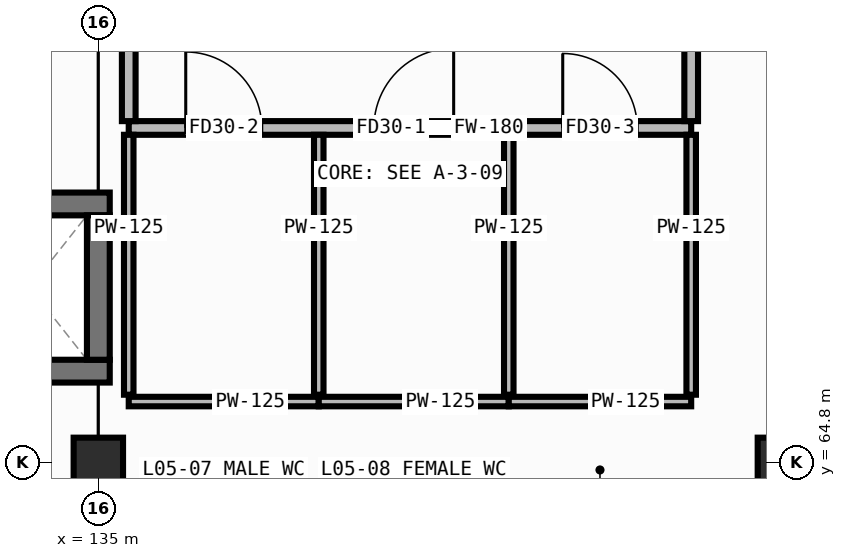
"""IFC4 building model, lengths in metres.
Left out: names, types, materials, properties, quantities, classifications, styles, units other than length and angle.
Written with IfcOpenShell. Run it as: python <this file> out.ifc"""

import sys

from ifc_helpers import new_model, si_unit, direction, frame, frame_2d, origin, origin_2d, place, context, subcontext, project, spatial, rectangle, hollow_rectangle, extrude, element, fill, save


model = new_model("IFC4")
c1 = context("Model", 3, precision=1e-05, world=origin(), true_north=direction((0.0, 1.0)))
c2 = subcontext(c1, "Body", "Model", "MODEL_VIEW")
j1 = project(units=[si_unit("LENGTHUNIT", "METRE"), si_unit("PLANEANGLEUNIT", "RADIAN")], contexts=[c1])
p1 = place(None, origin())
s1 = spatial("IfcSite", under=j1, at=p1, CompositionType="ELEMENT")
p2 = place(p1, origin())
s2 = spatial("IfcBuilding", under=s1, at=p2, CompositionType="ELEMENT")
p3 = place(p2, frame((0.0, 0.0, 17.0)))
s3 = spatial("IfcBuildingStorey", under=s2, at=p3, CompositionType="ELEMENT", Elevation=17.0)
for number, where, z_axis, x_axis in (
    (1, (135.0, 64.8, 0.0), (0.0, 0.0, 1.0), (1.0, 0.0, 0.0)),
    (2, (144.0, 64.8, 0.0), (0.0, 0.0, 1.0), (1.0, 0.0, 0.0)),
):
    element("IfcColumn", number, at=place(p3, frame(where, z_axis=z_axis, x_axis=x_axis)), inside=s3, PredefinedType="COLUMN", context=c2, shape_type="SweptSolid", body=[
        extrude(hollow_rectangle(XDim=0.65, YDim=0.65, WallThickness=0.025, at=origin_2d()), origin(), (0.0, 0.0, 1.0), 3.6),
    ])
for number, where, z_axis, x_axis in (
    (3, (133.05, 66.0, 0.0), (0.0, 0.0, 1.0), (1.0, 0.0, 0.0)),
    (4, (133.05, 68.2, 0.0), (0.0, 0.0, 1.0), (1.0, 0.0, 0.0)),
):
    element("IfcWall", number, at=place(p3, frame(where, z_axis=z_axis, x_axis=x_axis)), inside=s3, PredefinedType="SHEAR", context=c2, shape_type="SweptSolid", body=[
        extrude(rectangle(XDim=2.1, YDim=0.3, at=frame_2d((1.05, 0.0))), origin(), (0.0, 0.0, 1.0), 3.34),
    ])
p4 = place(p3, frame((135.0, 66.15, 0.0), z_axis=(0.0, 0.0, 1.0), x_axis=(0.0, 1.0, 0.0)))
e5 = element("IfcWall", 5, at=p4, inside=s3, PredefinedType="SHEAR", context=c2, shape_type="SweptSolid", body=[
    extrude(rectangle(XDim=1.9, YDim=0.3, at=frame_2d((0.95, 0.0))), origin(), (0.0, 0.0, 1.0), 3.34),
])
p5 = place(p3, frame((135.4, 69.2, 0.0), z_axis=(0.0, 0.0, 1.0), x_axis=(1.0, 0.0, 0.0)))
e6 = element("IfcWall", 6, at=p5, inside=s3, PredefinedType="PARTITIONING", context=c2, shape_type="SweptSolid", body=[
    extrude(rectangle(XDim=7.4, YDim=0.18, at=frame_2d((3.7, 0.0))), origin(), (0.0, 0.0, 1.0), 3.34),
])
p6 = place(p5, frame((0.75, 0.0, 0.0)))
e7 = element("IfcOpeningElement", 7, at=p6, cuts=e6, PredefinedType="OPENING", context=c2, shape_type="SweptSolid", body=[
    extrude(rectangle(XDim=1.0, YDim=2.08, at=frame_2d((0.5, 1.04))), frame((0.0, 0.102, 0.0), z_axis=(0.0, -1.0, 0.0), x_axis=(1.0, 0.0, 0.0)), (0.0, 0.0, 1.0), 0.204),
])
p7 = place(p5, frame((3.225, 0.0, 0.0)))
e8 = element("IfcOpeningElement", 8, at=p7, cuts=e6, PredefinedType="OPENING", context=c2, shape_type="SweptSolid", body=[
    extrude(rectangle(XDim=1.05, YDim=2.1, at=frame_2d((0.525, 1.05))), frame((0.0, 0.102, 0.0), z_axis=(0.0, -1.0, 0.0), x_axis=(1.0, 0.0, 0.0)), (0.0, 0.0, 1.0), 0.204),
])
p8 = place(p5, frame((5.71, 0.0, 0.0)))
e9 = element("IfcOpeningElement", 9, at=p8, cuts=e6, PredefinedType="OPENING", context=c2, shape_type="SweptSolid", body=[
    extrude(rectangle(XDim=0.98, YDim=2.02, at=frame_2d((0.49, 1.01))), frame((0.0, 0.102, 0.0), z_axis=(0.0, -1.0, 0.0), x_axis=(1.0, 0.0, 0.0)), (0.0, 0.0, 1.0), 0.204),
])
for number, where, z_axis, x_axis in (
    (10, (135.4, 69.29, 0.0), (0.0, 0.0, 1.0), (0.0, 1.0, 0.0)),
    (11, (142.8, 69.29, 0.0), (0.0, 0.0, 1.0), (0.0, 1.0, 0.0)),
):
    element("IfcWall", number, at=place(p3, frame(where, z_axis=z_axis, x_axis=x_axis)), inside=s3, PredefinedType="PARTITIONING", context=c2, shape_type="SweptSolid", body=[
        extrude(rectangle(XDim=2.22, YDim=0.18, at=frame_2d((1.11, 0.0))), origin(), (0.0, 0.0, 1.0), 3.34),
    ])
p9 = place(p3, frame((135.4, 65.6, 0.0), z_axis=(0.0, 0.0, 1.0), x_axis=(1.0, 0.0, 0.0)))
e12 = element("IfcWall", 12, at=p9, inside=s3, PredefinedType="PARTITIONING", context=c2, shape_type="SweptSolid", body=[
    extrude(rectangle(XDim=2.5, YDim=0.125, at=frame_2d((1.25, 0.0))), origin(), (0.0, 0.0, 1.0), 3.34),
])
for number, where, z_axis, x_axis in (
    (13, (135.4, 65.69, 0.0), (0.0, 0.0, 1.0), (0.0, 1.0, 0.0)),
    (14, (137.9, 65.69, 0.0), (0.0, 0.0, 1.0), (0.0, 1.0, 0.0)),
):
    element("IfcWall", number, at=place(p3, frame(where, z_axis=z_axis, x_axis=x_axis)), inside=s3, PredefinedType="PARTITIONING", context=c2, shape_type="SweptSolid", body=[
        extrude(rectangle(XDim=3.42, YDim=0.125, at=frame_2d((1.71, 0.0))), origin(), (0.0, 0.0, 1.0), 3.34),
    ])
p10 = place(p3, frame((137.9, 65.6, 0.0), z_axis=(0.0, 0.0, 1.0), x_axis=(1.0, 0.0, 0.0)))
e15 = element("IfcWall", 15, at=p10, inside=s3, PredefinedType="PARTITIONING", context=c2, shape_type="SweptSolid", body=[
    extrude(rectangle(XDim=2.5, YDim=0.125, at=frame_2d((1.25, 0.0))), origin(), (0.0, 0.0, 1.0), 3.34),
])
p11 = place(p3, frame((140.4, 65.69, 0.0), z_axis=(0.0, 0.0, 1.0), x_axis=(0.0, 1.0, 0.0)))
e16 = element("IfcWall", 16, at=p11, inside=s3, PredefinedType="PARTITIONING", context=c2, shape_type="SweptSolid", body=[
    extrude(rectangle(XDim=3.42, YDim=0.125, at=frame_2d((1.71, 0.0))), origin(), (0.0, 0.0, 1.0), 3.34),
])
p12 = place(p3, frame((140.4, 65.6, 0.0), z_axis=(0.0, 0.0, 1.0), x_axis=(1.0, 0.0, 0.0)))
e17 = element("IfcWall", 17, at=p12, inside=s3, PredefinedType="PARTITIONING", context=c2, shape_type="SweptSolid", body=[
    extrude(rectangle(XDim=2.4, YDim=0.125, at=frame_2d((1.2, 0.0))), origin(), (0.0, 0.0, 1.0), 3.34),
])
p13 = place(p3, frame((142.8, 65.69, 0.0), z_axis=(0.0, 0.0, 1.0), x_axis=(0.0, 1.0, 0.0)))
e18 = element("IfcWall", 18, at=p13, inside=s3, PredefinedType="PARTITIONING", context=c2, shape_type="SweptSolid", body=[
    extrude(rectangle(XDim=3.42, YDim=0.125, at=frame_2d((1.71, 0.0))), origin(), (0.0, 0.0, 1.0), 3.34),
])
p14 = place(p6, origin())
e19 = element("IfcDoor", 19, at=p14, inside=s3, OperationType="SINGLE_SWING_LEFT", PredefinedType="DOOR", context=c2, shape_type="SweptSolid", body=[
    extrude(rectangle(XDim=1.0, YDim=2.08, at=frame_2d((0.5, 1.04))), frame((0.0, 0.025, 0.0), z_axis=(0.0, -1.0, 0.0), x_axis=(1.0, 0.0, 0.0)), (0.0, 0.0, 1.0), 0.05),
])
fill(e7, e19)
p15 = place(p7, origin())
e20 = element("IfcDoor", 20, at=p15, inside=s3, OperationType="SINGLE_SWING_RIGHT", PredefinedType="DOOR", context=c2, shape_type="SweptSolid", body=[
    extrude(rectangle(XDim=1.05, YDim=2.1, at=frame_2d((0.525, 1.05))), frame((0.0, 0.025, 0.0), z_axis=(0.0, -1.0, 0.0), x_axis=(1.0, 0.0, 0.0)), (0.0, 0.0, 1.0), 0.05),
])
fill(e8, e20)
p16 = place(p8, origin())
e21 = element("IfcDoor", 21, at=p16, inside=s3, OperationType="SINGLE_SWING_LEFT", PredefinedType="DOOR", context=c2, shape_type="SweptSolid", body=[
    extrude(rectangle(XDim=0.98, YDim=2.02, at=frame_2d((0.49, 1.01))), frame((0.0, 0.025, 0.0), z_axis=(0.0, -1.0, 0.0), x_axis=(1.0, 0.0, 0.0)), (0.0, 0.0, 1.0), 0.05),
])
fill(e9, e21)
save(model, sys.argv[1])
